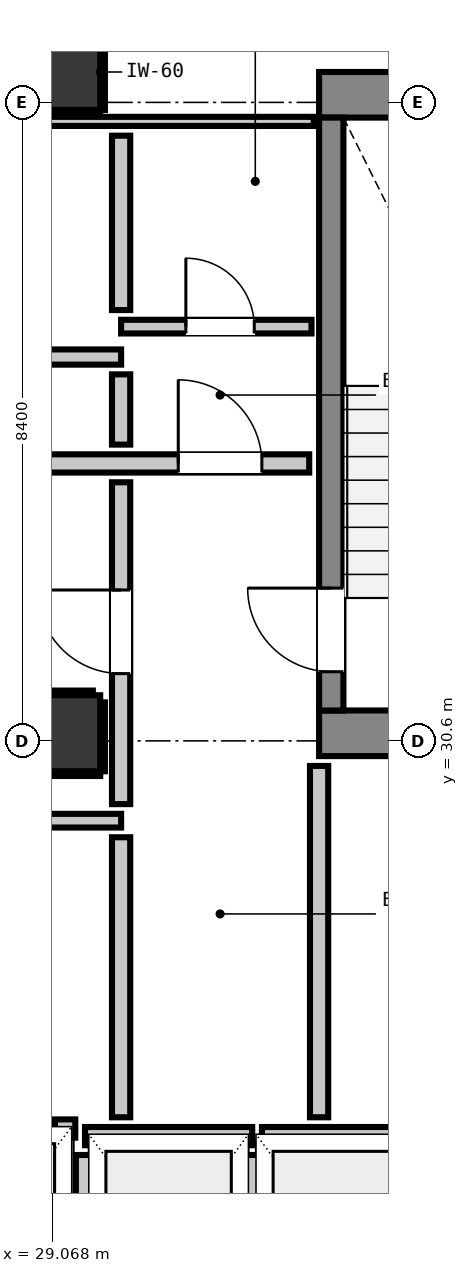
"""IFC4 building model, lengths in metres.
Left out: names, types, materials, properties, quantities, classifications, styles, units other than length and angle.
Written with IfcOpenShell. Run it as: python <this file> out.ifc"""

import sys

from ifc_helpers import new_model, si_unit, direction, frame, frame_2d, origin, origin_2d, place, context, subcontext, project, spatial, rectangle, extrude, element, fill, save


model = new_model("IFC4")
c1 = context("Model", 3, precision=1e-05, world=origin(), true_north=direction((0.0, 1.0)))
c2 = subcontext(c1, "Body", "Model", "MODEL_VIEW")
j1 = project(units=[si_unit("LENGTHUNIT", "METRE"), si_unit("PLANEANGLEUNIT", "RADIAN")], contexts=[c1])
p1 = place(None, origin())
s1 = spatial("IfcSite", under=j1, at=p1, CompositionType="ELEMENT")
p2 = place(p1, origin())
s2 = spatial("IfcBuilding", under=s1, at=p2, CompositionType="ELEMENT")
p3 = place(p2, frame((0.0, 0.0, 122.68)))
s3 = spatial("IfcBuildingStorey", under=s2, at=p3, CompositionType="ELEMENT", Elevation=122.68)
p4 = place(p3, frame((29.2, 39.4, 0.0), z_axis=(0.0, 0.0, 1.0), x_axis=(1.0, 0.0, 0.0)))
e1 = element("IfcColumn", 1, at=p4, inside=s3, PredefinedType="COLUMN", context=c2, shape_type="SweptSolid", body=[
    extrude(rectangle(XDim=1.0, YDim=1.0, at=origin_2d()), origin(), (0.0, 0.0, 1.0), 3.32),
])
p5 = place(p3, frame((32.58, 39.1, 0.0), z_axis=(0.0, 0.0, 1.0), x_axis=(1.0, 0.0, 0.0)))
e2 = element("IfcWall", 2, at=p5, inside=s3, PredefinedType="SHEAR", context=c2, shape_type="SweptSolid", body=[
    extrude(rectangle(XDim=4.08, YDim=0.6, at=frame_2d((2.04, 0.0))), origin(), (0.0, 0.0, 1.0), 3.32),
])
p6 = place(p3, frame((32.58, 30.7, 0.0), z_axis=(0.0, 0.0, 1.0), x_axis=(1.0, 0.0, 0.0)))
e3 = element("IfcWall", 3, at=p6, inside=s3, PredefinedType="SHEAR", context=c2, shape_type="SweptSolid", body=[
    extrude(rectangle(XDim=3.415, YDim=0.6, at=frame_2d((1.708, 0.0))), origin(), (0.0, 0.0, 1.0), 3.32),
])
p7 = place(p3, frame((32.74, 31.0, 0.0), z_axis=(0.0, 0.0, 1.0), x_axis=(0.0, 1.0, 0.0)))
e4 = element("IfcWall", 4, at=p7, inside=s3, PredefinedType="SHEAR", context=c2, shape_type="SweptSolid", body=[
    extrude(rectangle(XDim=7.8, YDim=0.32, at=frame_2d((3.9, 0.0))), origin(), (0.0, 0.0, 1.0), 3.32),
])
p8 = place(p7, frame((0.51, 0.0, 0.0)))
e5 = element("IfcOpeningElement", 5, at=p8, cuts=e4, PredefinedType="OPENING", context=c2, shape_type="SweptSolid", body=[
    extrude(rectangle(XDim=1.1, YDim=2.15, at=frame_2d((0.55, 1.075))), frame((0.0, 0.17, 0.0), z_axis=(0.0, -1.0, 0.0), x_axis=(1.0, 0.0, 0.0)), (0.0, 0.0, 1.0), 0.34),
])
p9 = place(p3, frame((29.2, 30.7, 0.0), z_axis=(0.0, 0.0, 1.0), x_axis=(1.0, 0.0, 0.0)))
e6 = element("IfcColumn", 6, at=p9, inside=s3, PredefinedType="COLUMN", context=c2, shape_type="SweptSolid", body=[
    extrude(rectangle(XDim=1.0, YDim=1.0, at=origin_2d()), origin(), (0.0, 0.0, 1.0), 3.32),
])
p10 = place(p3, frame((29.5, 25.4, 0.0), z_axis=(0.0, 0.0, 1.0), x_axis=(1.0, 0.0, 0.0)))
e7 = element("IfcWall", 7, at=p10, inside=s3, PredefinedType="PARTITIONING", context=c2, shape_type="SweptSolid", body=[
    extrude(rectangle(XDim=2.2, YDim=0.24, at=frame_2d((1.1, 0.0))), origin(), (0.0, 0.0, 1.0), 2.9),
])
p11 = place(p3, frame((29.5, 22.632, 0.0), z_axis=(0.0, 0.0, 1.0), x_axis=(0.0, 1.0, 0.0)))
e8 = element("IfcWall", 8, at=p11, inside=s3, PredefinedType="PARTITIONING", context=c2, shape_type="SweptSolid", body=[
    extrude(rectangle(XDim=2.52, YDim=0.24, at=frame_2d((1.26, 0.0))), origin(), (0.0, 0.0, 1.0), 0.905),
])
p12 = place(p3, frame((31.7, 22.63, 0.0), z_axis=(0.0, 0.0, 1.0), x_axis=(0.0, 1.0, 0.0)))
e9 = element("IfcWall", 9, at=p12, inside=s3, PredefinedType="PARTITIONING", context=c2, shape_type="SweptSolid", body=[
    extrude(rectangle(XDim=2.522, YDim=0.24, at=frame_2d((1.261, 0.0))), origin(), (0.0, 0.0, 1.0), 2.9),
])
p13 = place(p3, frame((31.828, 25.4, 0.0), z_axis=(0.0, 0.0, 1.0), x_axis=(1.0, 0.0, 0.0)))
e10 = element("IfcWall", 10, at=p13, inside=s3, PredefinedType="PARTITIONING", context=c2, shape_type="SweptSolid", body=[
    extrude(rectangle(XDim=2.072, YDim=0.24, at=frame_2d((1.036, 0.0))), origin(), (0.0, 0.0, 1.0), 2.9),
])
p14 = place(p3, frame((29.103, 25.5, 0.0), z_axis=(0.0, 0.0, 1.0), x_axis=(1.0, 0.0, 0.0)))
e11 = element("IfcWall", 11, at=p14, inside=s3, PredefinedType="PARTITIONING", context=c2, shape_type="SweptSolid", body=[
    extrude(rectangle(XDim=0.269, YDim=0.24, at=frame_2d((0.135, 0.0))), origin(), (0.0, 0.0, 1.0), 2.9),
])
p15 = place(p3, frame((28.702, 34.25, 0.0), z_axis=(0.0, 0.0, 1.0), x_axis=(1.0, 0.0, 0.0)))
e12 = element("IfcWall", 12, at=p15, inside=s3, PredefinedType="PARTITIONING", context=c2, shape_type="SweptSolid", body=[
    extrude(rectangle(XDim=3.748, YDim=0.24, at=frame_2d((1.874, 0.0))), origin(), (0.0, 0.0, 1.0), 2.9),
])
p16 = place(p15, frame((2.025, 0.0, 0.0)))
e13 = element("IfcOpeningElement", 13, at=p16, cuts=e12, PredefinedType="OPENING", context=c2, shape_type="SweptSolid", body=[
    extrude(rectangle(XDim=1.1, YDim=2.15, at=frame_2d((0.55, 1.075))), frame((0.0, 0.13, 0.0), z_axis=(0.0, -1.0, 0.0), x_axis=(1.0, 0.0, 0.0)), (0.0, 0.0, 1.0), 0.26),
])
p17 = place(p3, frame((18.95, 35.65, 0.0), z_axis=(0.0, 0.0, 1.0), x_axis=(1.0, 0.0, 0.0)))
e14 = element("IfcWall", 14, at=p17, inside=s3, PredefinedType="PARTITIONING", context=c2, shape_type="SweptSolid", body=[
    extrude(rectangle(XDim=11.025, YDim=0.2, at=frame_2d((5.513, 0.0))), origin(), (0.0, 0.0, 1.0), 2.9),
])
p18 = place(p3, frame((20.65, 29.55, 0.0), z_axis=(0.0, 0.0, 1.0), x_axis=(1.0, 0.0, 0.0)))
e15 = element("IfcWall", 15, at=p18, inside=s3, PredefinedType="PARTITIONING", context=c2, shape_type="SweptSolid", body=[
    extrude(rectangle(XDim=9.325, YDim=0.18, at=frame_2d((4.663, 0.0))), origin(), (0.0, 0.0, 1.0), 2.9),
])
p19 = place(p3, frame((29.975, 36.05, 0.0), z_axis=(0.0, 0.0, 1.0), x_axis=(1.0, 0.0, 0.0)))
e16 = element("IfcWall", 16, at=p19, inside=s3, PredefinedType="PARTITIONING", context=c2, shape_type="SweptSolid", body=[
    extrude(rectangle(XDim=2.505, YDim=0.18, at=frame_2d((1.252, 0.0))), origin(), (0.0, 0.0, 1.0), 2.9),
])
p20 = place(p19, frame((0.852, 0.0, 0.0)))
e17 = element("IfcOpeningElement", 17, at=p20, cuts=e16, PredefinedType="OPENING", context=c2, shape_type="SweptSolid", body=[
    extrude(rectangle(XDim=0.9, YDim=2.1, at=frame_2d((0.45, 1.05))), frame((0.0, 0.1, 0.0), z_axis=(0.0, -1.0, 0.0), x_axis=(1.0, 0.0, 0.0)), (0.0, 0.0, 1.0), 0.2),
])
p21 = place(p3, frame((18.95, 38.75, 0.0), z_axis=(0.0, 0.0, 1.0), x_axis=(1.0, 0.0, 0.0)))
e18 = element("IfcWall", 18, at=p21, inside=s3, PredefinedType="PARTITIONING", context=c2, shape_type="SweptSolid", body=[
    extrude(rectangle(XDim=13.56, YDim=0.12, at=frame_2d((6.78, 0.0))), origin(), (0.0, 0.0, 1.0), 0.905),
])
p22 = place(p3, frame((29.975, 25.648, 0.0), z_axis=(0.0, 0.0, 1.0), x_axis=(0.0, 1.0, 0.0)))
e19 = element("IfcWall", 19, at=p22, inside=s3, PredefinedType="PARTITIONING", context=c2, shape_type="SweptSolid", body=[
    extrude(rectangle(XDim=3.684, YDim=0.24, at=frame_2d((1.842, 0.0))), origin(), (0.0, 0.0, 1.0), 2.9),
])
p23 = place(p3, frame((29.975, 29.768, 0.0), z_axis=(0.0, 0.0, 1.0), x_axis=(0.0, 1.0, 0.0)))
e20 = element("IfcWall", 20, at=p23, inside=s3, PredefinedType="PARTITIONING", context=c2, shape_type="SweptSolid", body=[
    extrude(rectangle(XDim=4.234, YDim=0.24, at=frame_2d((2.117, 0.0))), origin(), (0.0, 0.0, 1.0), 2.9),
])
p24 = place(p23, frame((1.717, 0.0, 0.0)))
e21 = element("IfcOpeningElement", 21, at=p24, cuts=e20, PredefinedType="OPENING", context=c2, shape_type="SweptSolid", body=[
    extrude(rectangle(XDim=1.1, YDim=2.15, at=frame_2d((0.55, 1.075))), frame((0.0, 0.13, 0.0), z_axis=(0.0, -1.0, 0.0), x_axis=(1.0, 0.0, 0.0)), (0.0, 0.0, 1.0), 0.26),
])
p25 = place(p3, frame((29.975, 34.498, 0.0), z_axis=(0.0, 0.0, 1.0), x_axis=(0.0, 1.0, 0.0)))
e22 = element("IfcWall", 22, at=p25, inside=s3, PredefinedType="PARTITIONING", context=c2, shape_type="SweptSolid", body=[
    extrude(rectangle(XDim=0.924, YDim=0.24, at=frame_2d((0.462, 0.0))), origin(), (0.0, 0.0, 1.0), 2.9),
])
p26 = place(p3, frame((29.975, 36.268, 0.0), z_axis=(0.0, 0.0, 1.0), x_axis=(0.0, 1.0, 0.0)))
e23 = element("IfcWall", 23, at=p26, inside=s3, PredefinedType="PARTITIONING", context=c2, shape_type="SweptSolid", body=[
    extrude(rectangle(XDim=2.294, YDim=0.24, at=frame_2d((1.147, 0.0))), origin(), (0.0, 0.0, 1.0), 2.9),
])
p27 = place(p3, frame((32.58, 25.648, 0.0), z_axis=(0.0, 0.0, 1.0), x_axis=(0.0, 1.0, 0.0)))
e24 = element("IfcWall", 24, at=p27, inside=s3, PredefinedType="PARTITIONING", context=c2, shape_type="SweptSolid", body=[
    extrude(rectangle(XDim=4.622, YDim=0.24, at=frame_2d((2.311, 0.0))), origin(), (0.0, 0.0, 1.0), 2.9),
])
for number, where, z_axis, x_axis in (
    (25, (28.7, 38.868, 0.0), (0.0, 0.0, 1.0), (1.0, 0.0, 0.0)),
    (26, (29.732, 38.9, 0.0), (0.0, 0.0, 1.0), (0.0, 1.0, 0.0)),
    (27, (28.7, 30.168, 0.0), (0.0, 0.0, 1.0), (1.0, 0.0, 0.0)),
):
    element("IfcWall", number, at=place(p3, frame(where, z_axis=z_axis, x_axis=x_axis)), inside=s3, PredefinedType="PARTITIONING", context=c2, shape_type="SweptSolid", body=[
        extrude(rectangle(XDim=1.0, YDim=0.06, at=frame_2d((0.5, 0.0))), origin(), (0.0, 0.0, 1.0), 0.905),
    ])
p28 = place(p3, frame((28.7, 31.232, 0.0), z_axis=(0.0, 0.0, 1.0), x_axis=(1.0, 0.0, 0.0)))
e28 = element("IfcWall", 28, at=p28, inside=s3, PredefinedType="PARTITIONING", context=c2, shape_type="SweptSolid", body=[
    extrude(rectangle(XDim=0.903, YDim=0.06, at=frame_2d((0.452, 0.0))), origin(), (0.0, 0.0, 1.0), 0.905),
])
p29 = place(p3, frame((29.732, 30.2, 0.0), z_axis=(0.0, 0.0, 1.0), x_axis=(0.0, 1.0, 0.0)))
e29 = element("IfcWall", 29, at=p29, inside=s3, PredefinedType="PARTITIONING", context=c2, shape_type="SweptSolid", body=[
    extrude(rectangle(XDim=0.907, YDim=0.06, at=frame_2d((0.454, 0.0))), origin(), (0.0, 0.0, 1.0), 0.905),
])
p30 = place(p8, origin())
e30 = element("IfcDoor", 30, at=p30, inside=s3, OperationType="SINGLE_SWING_RIGHT", PredefinedType="DOOR", context=c2, shape_type="SweptSolid", body=[
    extrude(rectangle(XDim=1.1, YDim=2.15, at=frame_2d((0.55, 1.075))), frame((0.0, 0.025, 0.0), z_axis=(0.0, -1.0, 0.0), x_axis=(1.0, 0.0, 0.0)), (0.0, 0.0, 1.0), 0.05),
])
fill(e5, e30)
p31 = place(p24, origin())
e31 = element("IfcDoor", 31, at=p31, inside=s3, OperationType="SINGLE_SWING_RIGHT", PredefinedType="DOOR", context=c2, shape_type="SweptSolid", body=[
    extrude(rectangle(XDim=1.1, YDim=2.15, at=frame_2d((0.55, 1.075))), frame((0.0, 0.025, 0.0), z_axis=(0.0, -1.0, 0.0), x_axis=(1.0, 0.0, 0.0)), (0.0, 0.0, 1.0), 0.05),
])
fill(e21, e31)
p32 = place(p16, origin())
e32 = element("IfcDoor", 32, at=p32, inside=s3, OperationType="SINGLE_SWING_LEFT", PredefinedType="DOOR", context=c2, shape_type="SweptSolid", body=[
    extrude(rectangle(XDim=1.1, YDim=2.15, at=frame_2d((0.55, 1.075))), frame((0.0, 0.025, 0.0), z_axis=(0.0, -1.0, 0.0), x_axis=(1.0, 0.0, 0.0)), (0.0, 0.0, 1.0), 0.05),
])
fill(e13, e32)
p33 = place(p20, origin())
e33 = element("IfcDoor", 33, at=p33, inside=s3, OperationType="SINGLE_SWING_LEFT", PredefinedType="DOOR", context=c2, shape_type="SweptSolid", body=[
    extrude(rectangle(XDim=0.9, YDim=2.1, at=frame_2d((0.45, 1.05))), frame((0.0, 0.025, 0.0), z_axis=(0.0, -1.0, 0.0), x_axis=(1.0, 0.0, 0.0)), (0.0, 0.0, 1.0), 0.05),
])
fill(e17, e33)
save(model, sys.argv[1])
